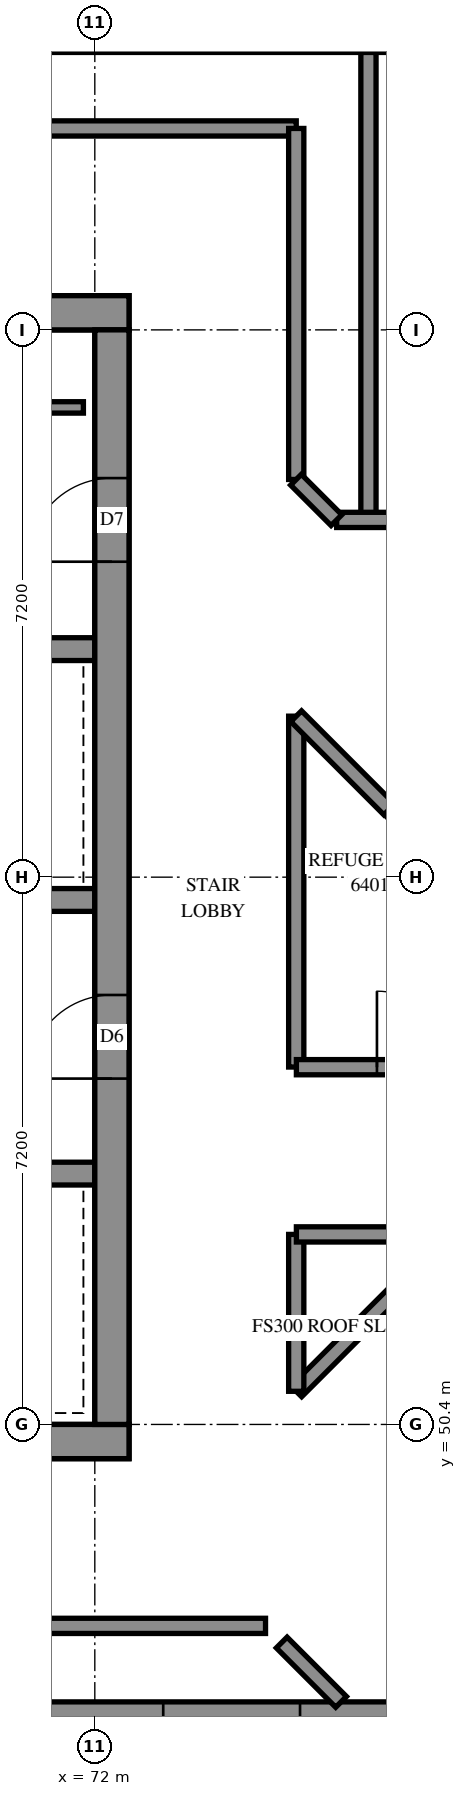
"""IFC4 building model, lengths in metres.
Left out: names, types, materials, properties, quantities, classifications, styles, units other than length and angle.
Written with IfcOpenShell. Run it as: python <this file> out.ifc"""

import sys

from ifc_helpers import new_model, si_unit, direction, frame, frame_2d, origin, place, context, subcontext, project, spatial, polyline, rectangle, outline, extrude, element, fill, save


model = new_model("IFC4")
c1 = context("Model", 3, precision=1e-05, world=origin(), true_north=direction((0.0, 1.0)))
c2 = subcontext(c1, "Body", "Model", "MODEL_VIEW")
j1 = project(units=[si_unit("LENGTHUNIT", "METRE"), si_unit("PLANEANGLEUNIT", "RADIAN")], contexts=[c1])
p1 = place(None, origin())
s1 = spatial("IfcSite", under=j1, at=p1, CompositionType="ELEMENT")
p2 = place(p1, origin())
s2 = spatial("IfcBuilding", under=s1, at=p2, CompositionType="ELEMENT")
p3 = place(p2, frame((0.0, 0.0, 234.6)))
s3 = spatial("IfcBuildingStorey", under=s2, at=p3, CompositionType="ELEMENT", Elevation=234.6)
p4 = place(p3, frame((57.15, 50.175, -0.3), z_axis=(0.0, 0.0, 1.0), x_axis=(1.0, 0.0, 0.0)))
e1 = element("IfcWall", 1, at=p4, inside=s3, PredefinedType="SHEAR", context=c2, shape_type="SweptSolid", body=[
    extrude(rectangle(XDim=15.3, YDim=0.45, at=frame_2d((7.65, 0.0))), origin(), (0.0, 0.0, 1.0), 4.3),
])
p5 = place(p3, frame((57.15, 65.025, -0.3), z_axis=(0.0, 0.0, 1.0), x_axis=(1.0, 0.0, 0.0)))
e2 = element("IfcWall", 2, at=p5, inside=s3, PredefinedType="SHEAR", context=c2, shape_type="SweptSolid", body=[
    extrude(rectangle(XDim=15.3, YDim=0.45, at=frame_2d((7.65, 0.0))), origin(), (0.0, 0.0, 1.0), 4.3),
])
p6 = place(p5, frame((10.45, 0.0, 0.3)))
e3 = element("IfcOpeningElement", 3, at=p6, cuts=e2, PredefinedType="OPENING", context=c2, shape_type="SweptSolid", body=[
    extrude(rectangle(XDim=0.8, YDim=2.1, at=frame_2d((0.4, 1.05))), frame((0.0, 0.235, 0.0), z_axis=(0.0, -1.0, 0.0), x_axis=(1.0, 0.0, 0.0)), (0.0, 0.0, 1.0), 0.47),
])
p7 = place(p3, frame((72.225, 50.4, -0.3), z_axis=(0.0, 0.0, 1.0), x_axis=(0.0, 1.0, 0.0)))
e4 = element("IfcWall", 4, at=p7, inside=s3, PredefinedType="SHEAR", context=c2, shape_type="SweptSolid", body=[
    extrude(rectangle(XDim=14.4, YDim=0.45, at=frame_2d((7.2, 0.0))), origin(), (0.0, 0.0, 1.0), 4.3),
])
p8 = place(p7, frame((4.55, 0.0, 0.3)))
e5 = element("IfcOpeningElement", 5, at=p8, cuts=e4, PredefinedType="OPENING", context=c2, shape_type="SweptSolid", body=[
    extrude(rectangle(XDim=1.1, YDim=2.1, at=frame_2d((0.55, 1.05))), frame((0.0, 0.235, 0.0), z_axis=(0.0, -1.0, 0.0), x_axis=(1.0, 0.0, 0.0)), (0.0, 0.0, 1.0), 0.47),
])
p9 = place(p7, frame((11.35, 0.0, 0.3)))
e6 = element("IfcOpeningElement", 6, at=p9, cuts=e4, PredefinedType="OPENING", context=c2, shape_type="SweptSolid", body=[
    extrude(rectangle(XDim=1.1, YDim=2.1, at=frame_2d((0.55, 1.05))), frame((0.0, 0.235, 0.0), z_axis=(0.0, -1.0, 0.0), x_axis=(1.0, 0.0, 0.0)), (0.0, 0.0, 1.0), 0.47),
])
p10 = place(p3, frame((57.6, 53.7, 0.0), z_axis=(0.0, 0.0, 1.0), x_axis=(1.0, 0.0, 0.0)))
e7 = element("IfcWall", 7, at=p10, inside=s3, PredefinedType="SOLIDWALL", context=c2, shape_type="SweptSolid", body=[
    extrude(rectangle(XDim=14.4, YDim=0.3, at=frame_2d((7.2, 0.0))), origin(), (0.0, 0.0, 1.0), 4.7),
])
p11 = place(p10, frame((1.35, 0.0, 0.0)))
e8 = element("IfcOpeningElement", 8, at=p11, cuts=e7, PredefinedType="OPENING", context=c2, shape_type="SweptSolid", body=[
    extrude(rectangle(XDim=0.9, YDim=2.1, at=frame_2d((0.45, 1.05))), frame((0.0, 0.16, 0.0), z_axis=(0.0, -1.0, 0.0), x_axis=(1.0, 0.0, 0.0)), (0.0, 0.0, 1.0), 0.32),
])
p12 = place(p10, frame((4.95, 0.0, 0.0)))
e9 = element("IfcOpeningElement", 9, at=p12, cuts=e7, PredefinedType="OPENING", context=c2, shape_type="SweptSolid", body=[
    extrude(rectangle(XDim=0.9, YDim=2.1, at=frame_2d((0.45, 1.05))), frame((0.0, 0.16, 0.0), z_axis=(0.0, -1.0, 0.0), x_axis=(1.0, 0.0, 0.0)), (0.0, 0.0, 1.0), 0.32),
])
p13 = place(p10, frame((8.55, 0.0, 0.0)))
e10 = element("IfcOpeningElement", 10, at=p13, cuts=e7, PredefinedType="OPENING", context=c2, shape_type="SweptSolid", body=[
    extrude(rectangle(XDim=0.9, YDim=2.1, at=frame_2d((0.45, 1.05))), frame((0.0, 0.16, 0.0), z_axis=(0.0, -1.0, 0.0), x_axis=(1.0, 0.0, 0.0)), (0.0, 0.0, 1.0), 0.32),
])
p14 = place(p10, frame((12.05, 0.0, 0.0)))
e11 = element("IfcOpeningElement", 11, at=p14, cuts=e7, PredefinedType="OPENING", context=c2, shape_type="SweptSolid", body=[
    extrude(rectangle(XDim=1.1, YDim=2.1, at=frame_2d((0.55, 1.05))), frame((0.0, 0.16, 0.0), z_axis=(0.0, -1.0, 0.0), x_axis=(1.0, 0.0, 0.0)), (0.0, 0.0, 1.0), 0.32),
])
p15 = place(p3, frame((57.6, 57.3, 0.0), z_axis=(0.0, 0.0, 1.0), x_axis=(1.0, 0.0, 0.0)))
e12 = element("IfcWall", 12, at=p15, inside=s3, PredefinedType="SOLIDWALL", context=c2, shape_type="SweptSolid", body=[
    extrude(rectangle(XDim=14.4, YDim=0.3, at=frame_2d((7.2, 0.0))), origin(), (0.0, 0.0, 1.0), 4.7),
])
p16 = place(p15, frame((1.25, 0.0, 0.0)))
e13 = element("IfcOpeningElement", 13, at=p16, cuts=e12, PredefinedType="OPENING", context=c2, shape_type="SweptSolid", body=[
    extrude(rectangle(XDim=1.1, YDim=2.1, at=frame_2d((0.55, 1.05))), frame((0.0, 0.16, 0.0), z_axis=(0.0, -1.0, 0.0), x_axis=(1.0, 0.0, 0.0)), (0.0, 0.0, 1.0), 0.32),
])
p17 = place(p15, frame((4.85, 0.0, 0.0)))
e14 = element("IfcOpeningElement", 14, at=p17, cuts=e12, PredefinedType="OPENING", context=c2, shape_type="SweptSolid", body=[
    extrude(rectangle(XDim=1.1, YDim=2.1, at=frame_2d((0.55, 1.05))), frame((0.0, 0.16, 0.0), z_axis=(0.0, -1.0, 0.0), x_axis=(1.0, 0.0, 0.0)), (0.0, 0.0, 1.0), 0.32),
])
p18 = place(p15, frame((8.45, 0.0, 0.0)))
e15 = element("IfcOpeningElement", 15, at=p18, cuts=e12, PredefinedType="OPENING", context=c2, shape_type="SweptSolid", body=[
    extrude(rectangle(XDim=1.1, YDim=2.1, at=frame_2d((0.55, 1.05))), frame((0.0, 0.16, 0.0), z_axis=(0.0, -1.0, 0.0), x_axis=(1.0, 0.0, 0.0)), (0.0, 0.0, 1.0), 0.32),
])
p19 = place(p15, frame((12.05, 0.0, 0.0)))
e16 = element("IfcOpeningElement", 16, at=p19, cuts=e12, PredefinedType="OPENING", context=c2, shape_type="SweptSolid", body=[
    extrude(rectangle(XDim=1.1, YDim=2.1, at=frame_2d((0.55, 1.05))), frame((0.0, 0.16, 0.0), z_axis=(0.0, -1.0, 0.0), x_axis=(1.0, 0.0, 0.0)), (0.0, 0.0, 1.0), 0.32),
])
p20 = place(p3, frame((64.8, 60.6, 0.0), z_axis=(0.0, 0.0, 1.0), x_axis=(1.0, 0.0, 0.0)))
e17 = element("IfcWall", 17, at=p20, inside=s3, PredefinedType="SOLIDWALL", context=c2, shape_type="SweptSolid", body=[
    extrude(rectangle(XDim=7.2, YDim=0.3, at=frame_2d((3.6, 0.0))), origin(), (0.0, 0.0, 1.0), 4.7),
])
p21 = place(p3, frame((77.844, 68.725, 0.0), z_axis=(0.0, 0.0, 1.0), x_axis=(-1.0, 0.0, 0.0)))
e18 = element("IfcWall", 18, at=p21, inside=s3, PredefinedType="SOLIDWALL", context=c2, shape_type="SweptSolid", body=[
    extrude(outline(polyline([(-0.114, -0.275), (46.044, -0.275), (45.493, 0.275), (0.114, 0.275), (-0.114, -0.275)])), origin(), (0.0, 0.0, 1.0), 4.7),
])
p22 = place(p21, frame((3.193, 0.0, 0.9)))
e19 = element("IfcOpeningElement", 19, at=p22, cuts=e18, PredefinedType="OPENING", context=c2, shape_type="SweptSolid", body=[
    extrude(rectangle(XDim=1.8, YDim=3.6, at=frame_2d((0.9, 1.8))), frame((0.0, 0.285, 0.0), z_axis=(0.0, -1.0, 0.0), x_axis=(1.0, 0.0, 0.0)), (0.0, 0.0, 1.0), 0.57),
])
p23 = place(p21, frame((6.744, 0.0, 0.9)))
e20 = element("IfcOpeningElement", 20, at=p23, cuts=e18, PredefinedType="OPENING", context=c2, shape_type="SweptSolid", body=[
    extrude(rectangle(XDim=1.8, YDim=3.6, at=frame_2d((0.9, 1.8))), frame((0.0, 0.285, 0.0), z_axis=(0.0, -1.0, 0.0), x_axis=(1.0, 0.0, 0.0)), (0.0, 0.0, 1.0), 0.57),
])
p24 = place(p21, frame((10.344, 0.0, 0.9)))
e21 = element("IfcOpeningElement", 21, at=p24, cuts=e18, PredefinedType="OPENING", context=c2, shape_type="SweptSolid", body=[
    extrude(rectangle(XDim=1.8, YDim=3.6, at=frame_2d((0.9, 1.8))), frame((0.0, 0.285, 0.0), z_axis=(0.0, -1.0, 0.0), x_axis=(1.0, 0.0, 0.0)), (0.0, 0.0, 1.0), 0.57),
])
p25 = place(p21, frame((13.944, 0.0, 0.9)))
e22 = element("IfcOpeningElement", 22, at=p25, cuts=e18, PredefinedType="OPENING", context=c2, shape_type="SweptSolid", body=[
    extrude(rectangle(XDim=1.8, YDim=3.6, at=frame_2d((0.9, 1.8))), frame((0.0, 0.285, 0.0), z_axis=(0.0, -1.0, 0.0), x_axis=(1.0, 0.0, 0.0)), (0.0, 0.0, 1.0), 0.57),
])
p26 = place(p21, frame((17.544, 0.0, 0.9)))
e23 = element("IfcOpeningElement", 23, at=p26, cuts=e18, PredefinedType="OPENING", context=c2, shape_type="SweptSolid", body=[
    extrude(rectangle(XDim=1.8, YDim=3.6, at=frame_2d((0.9, 1.8))), frame((0.0, 0.285, 0.0), z_axis=(0.0, -1.0, 0.0), x_axis=(1.0, 0.0, 0.0)), (0.0, 0.0, 1.0), 0.57),
])
p27 = place(p21, frame((21.143, 0.0, 0.9)))
e24 = element("IfcOpeningElement", 24, at=p27, cuts=e18, PredefinedType="OPENING", context=c2, shape_type="SweptSolid", body=[
    extrude(rectangle(XDim=1.8, YDim=3.6, at=frame_2d((0.9, 1.8))), frame((0.0, 0.285, 0.0), z_axis=(0.0, -1.0, 0.0), x_axis=(1.0, 0.0, 0.0)), (0.0, 0.0, 1.0), 0.57),
])
p28 = place(p21, frame((24.744, 0.0, 0.9)))
e25 = element("IfcOpeningElement", 25, at=p28, cuts=e18, PredefinedType="OPENING", context=c2, shape_type="SweptSolid", body=[
    extrude(rectangle(XDim=1.8, YDim=3.6, at=frame_2d((0.9, 1.8))), frame((0.0, 0.285, 0.0), z_axis=(0.0, -1.0, 0.0), x_axis=(1.0, 0.0, 0.0)), (0.0, 0.0, 1.0), 0.57),
])
p29 = place(p21, frame((28.343, 0.0, 0.9)))
e26 = element("IfcOpeningElement", 26, at=p29, cuts=e18, PredefinedType="OPENING", context=c2, shape_type="SweptSolid", body=[
    extrude(rectangle(XDim=1.8, YDim=3.6, at=frame_2d((0.9, 1.8))), frame((0.0, 0.285, 0.0), z_axis=(0.0, -1.0, 0.0), x_axis=(1.0, 0.0, 0.0)), (0.0, 0.0, 1.0), 0.57),
])
p30 = place(p21, frame((31.944, 0.0, 0.9)))
e27 = element("IfcOpeningElement", 27, at=p30, cuts=e18, PredefinedType="OPENING", context=c2, shape_type="SweptSolid", body=[
    extrude(rectangle(XDim=1.8, YDim=3.6, at=frame_2d((0.9, 1.8))), frame((0.0, 0.285, 0.0), z_axis=(0.0, -1.0, 0.0), x_axis=(1.0, 0.0, 0.0)), (0.0, 0.0, 1.0), 0.57),
])
p31 = place(p21, frame((35.544, 0.0, 0.9)))
e28 = element("IfcOpeningElement", 28, at=p31, cuts=e18, PredefinedType="OPENING", context=c2, shape_type="SweptSolid", body=[
    extrude(rectangle(XDim=1.8, YDim=3.6, at=frame_2d((0.9, 1.8))), frame((0.0, 0.285, 0.0), z_axis=(0.0, -1.0, 0.0), x_axis=(1.0, 0.0, 0.0)), (0.0, 0.0, 1.0), 0.57),
])
p32 = place(p3, frame((53.675, 46.475, 0.0), z_axis=(0.0, 0.0, 1.0), x_axis=(1.0, 0.0, 0.0)))
e29 = element("IfcWall", 29, at=p32, inside=s3, PredefinedType="SOLIDWALL", context=c2, shape_type="SweptSolid", body=[
    extrude(outline(polyline([(-0.275, -0.275), (24.958, -0.275), (24.958, 0.275), (0.275, 0.275), (-0.275, -0.275)])), origin(), (0.0, 0.0, 1.0), 4.7),
])
p33 = place(p32, frame((1.3, 0.0, 0.9)))
e30 = element("IfcOpeningElement", 30, at=p33, cuts=e29, PredefinedType="OPENING", context=c2, shape_type="SweptSolid", body=[
    extrude(rectangle(XDim=1.8, YDim=3.6, at=frame_2d((0.9, 1.8))), frame((0.0, 0.285, 0.0), z_axis=(0.0, -1.0, 0.0), x_axis=(1.0, 0.0, 0.0)), (0.0, 0.0, 1.0), 0.57),
])
p34 = place(p32, frame((4.825, 0.0, 0.9)))
e31 = element("IfcOpeningElement", 31, at=p34, cuts=e29, PredefinedType="OPENING", context=c2, shape_type="SweptSolid", body=[
    extrude(rectangle(XDim=1.8, YDim=3.6, at=frame_2d((0.9, 1.8))), frame((0.0, 0.285, 0.0), z_axis=(0.0, -1.0, 0.0), x_axis=(1.0, 0.0, 0.0)), (0.0, 0.0, 1.0), 0.57),
])
p35 = place(p32, frame((8.425, 0.0, 0.9)))
e32 = element("IfcOpeningElement", 32, at=p35, cuts=e29, PredefinedType="OPENING", context=c2, shape_type="SweptSolid", body=[
    extrude(rectangle(XDim=1.8, YDim=3.6, at=frame_2d((0.9, 1.8))), frame((0.0, 0.285, 0.0), z_axis=(0.0, -1.0, 0.0), x_axis=(1.0, 0.0, 0.0)), (0.0, 0.0, 1.0), 0.57),
])
p36 = place(p32, frame((12.025, 0.0, 0.9)))
e33 = element("IfcOpeningElement", 33, at=p36, cuts=e29, PredefinedType="OPENING", context=c2, shape_type="SweptSolid", body=[
    extrude(rectangle(XDim=1.8, YDim=3.6, at=frame_2d((0.9, 1.8))), frame((0.0, 0.285, 0.0), z_axis=(0.0, -1.0, 0.0), x_axis=(1.0, 0.0, 0.0)), (0.0, 0.0, 1.0), 0.57),
])
p37 = place(p32, frame((15.625, 0.0, 0.9)))
e34 = element("IfcOpeningElement", 34, at=p37, cuts=e29, PredefinedType="OPENING", context=c2, shape_type="SweptSolid", body=[
    extrude(rectangle(XDim=1.8, YDim=3.6, at=frame_2d((0.9, 1.8))), frame((0.0, 0.285, 0.0), z_axis=(0.0, -1.0, 0.0), x_axis=(1.0, 0.0, 0.0)), (0.0, 0.0, 1.0), 0.57),
])
p38 = place(p32, frame((19.225, 0.0, 0.9)))
e35 = element("IfcOpeningElement", 35, at=p38, cuts=e29, PredefinedType="OPENING", context=c2, shape_type="SweptSolid", body=[
    extrude(rectangle(XDim=1.8, YDim=3.6, at=frame_2d((0.9, 1.8))), frame((0.0, 0.285, 0.0), z_axis=(0.0, -1.0, 0.0), x_axis=(1.0, 0.0, 0.0)), (0.0, 0.0, 1.0), 0.57),
])
p39 = place(p32, frame((22.3, 0.0, 0.9)))
e36 = element("IfcOpeningElement", 36, at=p39, cuts=e29, PredefinedType="OPENING", context=c2, shape_type="SweptSolid", body=[
    extrude(rectangle(XDim=1.8, YDim=3.6, at=frame_2d((0.9, 1.8))), frame((0.0, 0.285, 0.0), z_axis=(0.0, -1.0, 0.0), x_axis=(1.0, 0.0, 0.0)), (0.0, 0.0, 1.0), 0.57),
])
p40 = place(p3, frame((64.95, 63.78, 0.0), z_axis=(0.0, 0.0, 1.0), x_axis=(1.0, 0.0, 0.0)))
e37 = element("IfcWall", 37, at=p40, inside=s3, PredefinedType="PARTITIONING", context=c2, shape_type="SweptSolid", body=[
    extrude(rectangle(XDim=6.9, YDim=0.15, at=frame_2d((3.45, 0.0))), origin(), (0.0, 0.0, 1.0), 4.7),
])
p41 = place(p3, frame((54.95, 67.45, 0.0), z_axis=(0.0, 0.0, 1.0), x_axis=(1.0, 0.0, 0.0)))
e38 = element("IfcWall", 38, at=p41, inside=s3, PredefinedType="PARTITIONING", context=c2, shape_type="SweptSolid", body=[
    extrude(rectangle(XDim=19.7, YDim=0.2, at=frame_2d((9.85, 0.0))), origin(), (0.0, 0.0, 1.0), 4.7),
])
p42 = place(p3, frame((54.95, 47.75, 0.0), z_axis=(0.0, 0.0, 1.0), x_axis=(1.0, 0.0, 0.0)))
e39 = element("IfcWall", 39, at=p42, inside=s3, PredefinedType="PARTITIONING", context=c2, shape_type="SweptSolid", body=[
    extrude(rectangle(XDim=19.296, YDim=0.2, at=frame_2d((9.648, 0.0))), origin(), (0.0, 0.0, 1.0), 4.7),
])
p43 = place(p3, frame((75.6, 62.3, 0.0), z_axis=(0.0, 0.0, 1.0), x_axis=(0.0, 1.0, 0.0)))
e40 = element("IfcWall", 40, at=p43, inside=s3, PredefinedType="PARTITIONING", context=c2, shape_type="SweptSolid", body=[
    extrude(rectangle(XDim=6.15, YDim=0.2, at=frame_2d((3.075, 0.0))), origin(), (0.0, 0.0, 1.0), 4.7),
])
p44 = place(p3, frame((74.65, 62.832, 0.0), z_axis=(0.0, 0.0, 1.0), x_axis=(0.0, 1.0, 0.0)))
e41 = element("IfcWall", 41, at=p44, inside=s3, PredefinedType="PARTITIONING", context=c2, shape_type="SweptSolid", body=[
    extrude(rectangle(XDim=4.618, YDim=0.2, at=frame_2d((2.309, 0.0))), origin(), (0.0, 0.0, 1.0), 4.7),
])
p45 = place(p3, frame((74.65, 55.102, 0.0), z_axis=(0.0, 0.0, 1.0), x_axis=(0.0, 1.0, 0.0)))
e42 = element("IfcWall", 42, at=p45, inside=s3, PredefinedType="PARTITIONING", context=c2, shape_type="SweptSolid", body=[
    extrude(rectangle(XDim=4.616, YDim=0.2, at=frame_2d((2.308, 0.0))), origin(), (0.0, 0.0, 1.0), 4.7),
])
p46 = place(p3, frame((74.652, 55.1, 0.0), z_axis=(0.0, 0.0, 1.0), x_axis=(1.0, 0.0, 0.0)))
e43 = element("IfcWall", 43, at=p46, inside=s3, PredefinedType="PARTITIONING", context=c2, shape_type="SweptSolid", body=[
    extrude(rectangle(XDim=4.616, YDim=0.2, at=frame_2d((2.308, 0.0))), origin(), (0.0, 0.0, 1.0), 4.7),
])
p47 = place(p46, frame((1.06, 0.0, 0.0)))
e44 = element("IfcOpeningElement", 44, at=p47, cuts=e43, PredefinedType="OPENING", context=c2, shape_type="SweptSolid", body=[
    extrude(rectangle(XDim=1.0, YDim=2.1, at=frame_2d((0.5, 1.05))), frame((0.0, 0.11, 0.0), z_axis=(0.0, -1.0, 0.0), x_axis=(1.0, 0.0, 0.0)), (0.0, 0.0, 1.0), 0.22),
])
p48 = place(p3, frame((75.182, 62.3, 0.0), z_axis=(0.0, 0.0, 1.0), x_axis=(1.0, 0.0, 0.0)))
e45 = element("IfcWall", 45, at=p48, inside=s3, PredefinedType="PARTITIONING", context=c2, shape_type="SweptSolid", body=[
    extrude(rectangle(XDim=4.018, YDim=0.2, at=frame_2d((2.009, 0.0))), origin(), (0.0, 0.0, 1.0), 4.7),
])
p49 = place(p3, frame((74.651, 50.835, 0.0), z_axis=(0.0, 0.0, 1.0), x_axis=(0.7071067812, 0.7071067812, 0.0)))
e46 = element("IfcWall", 46, at=p49, inside=s3, PredefinedType="PARTITIONING", context=c2, shape_type="SweptSolid", body=[
    extrude(rectangle(XDim=2.919, YDim=0.2, at=frame_2d((1.459, 0.0))), origin(), (0.0, 0.0, 1.0), 4.7),
])
p50 = place(p3, frame((75.878, 58.496, 0.0), z_axis=(0.0, 0.0, 1.0), x_axis=(0.7075293128, -0.706683997, 0.0)))
e47 = element("IfcWall", 47, at=p50, inside=s3, PredefinedType="PARTITIONING", context=c2, shape_type="SweptSolid", body=[
    extrude(rectangle(XDim=2.366, YDim=0.2, at=frame_2d((1.183, 0.0))), origin(), (0.0, 0.0, 1.0), 4.7),
])
p51 = place(p3, frame((74.65, 50.836, 0.0), z_axis=(0.0, 0.0, 1.0), x_axis=(0.0, 1.0, 0.0)))
e48 = element("IfcWall", 48, at=p51, inside=s3, PredefinedType="PARTITIONING", context=c2, shape_type="SweptSolid", body=[
    extrude(rectangle(XDim=2.064, YDim=0.2, at=frame_2d((1.032, 0.0))), origin(), (0.0, 0.0, 1.0), 4.7),
])
p52 = place(p3, frame((74.652, 52.9, 0.0), z_axis=(0.0, 0.0, 1.0), x_axis=(1.0, 0.0, 0.0)))
e49 = element("IfcWall", 49, at=p52, inside=s3, PredefinedType="PARTITIONING", context=c2, shape_type="SweptSolid", body=[
    extrude(rectangle(XDim=2.062, YDim=0.2, at=frame_2d((1.031, 0.0))), origin(), (0.0, 0.0, 1.0), 4.7),
])
p53 = place(p3, frame((74.649, 59.717, 0.0), z_axis=(0.0, 0.0, 1.0), x_axis=(0.7065293157, -0.7076837754, 0.0)))
e50 = element("IfcWall", 50, at=p53, inside=s3, PredefinedType="PARTITIONING", context=c2, shape_type="SweptSolid", body=[
    extrude(rectangle(XDim=1.732, YDim=0.2, at=frame_2d((0.866, 0.0))), origin(), (0.0, 0.0, 1.0), 4.7),
])
p54 = place(p3, frame((74.459, 47.531, 0.0), z_axis=(0.0, 0.0, 1.0), x_axis=(0.7071520462, -0.7070615133, 0.0)))
e51 = element("IfcWall", 51, at=p54, inside=s3, PredefinedType="PARTITIONING", context=c2, shape_type="SweptSolid", body=[
    extrude(rectangle(XDim=1.105, YDim=0.2, at=frame_2d((0.552, 0.0))), origin(), (0.0, 0.0, 1.0), 4.7),
])
p55 = place(p3, frame((74.647, 62.829, 0.0), z_axis=(0.0, 0.0, 1.0), x_axis=(0.7071067812, -0.7071067812, 0.0)))
e52 = element("IfcWall", 52, at=p55, inside=s3, PredefinedType="PARTITIONING", context=c2, shape_type="SweptSolid", body=[
    extrude(rectangle(XDim=0.752, YDim=0.2, at=frame_2d((0.376, 0.0))), origin(), (0.0, 0.0, 1.0), 4.7),
])
p56 = place(p38, origin())
e53 = element("IfcWindow", 53, at=p56, inside=s3, PartitioningType="SINGLE_PANEL", PredefinedType="WINDOW", context=c2, shape_type="SweptSolid", body=[
    extrude(rectangle(XDim=1.8, YDim=3.6, at=frame_2d((0.9, 1.8))), frame((0.0, 0.155, 0.0), z_axis=(0.0, -1.0, 0.0), x_axis=(1.0, 0.0, 0.0)), (0.0, 0.0, 1.0), 0.06),
])
fill(e35, e53)
p57 = place(p8, origin())
e54 = element("IfcDoor", 54, at=p57, inside=s3, OperationType="DOUBLE_DOOR_SINGLE_SWING", PredefinedType="DOOR", context=c2, shape_type="SweptSolid", body=[
    extrude(rectangle(XDim=1.1, YDim=2.1, at=frame_2d((0.55, 1.05))), frame((0.0, 0.025, 0.0), z_axis=(0.0, -1.0, 0.0), x_axis=(1.0, 0.0, 0.0)), (0.0, 0.0, 1.0), 0.05),
])
fill(e5, e54)
p58 = place(p9, origin())
e55 = element("IfcDoor", 55, at=p58, inside=s3, OperationType="SINGLE_SWING_RIGHT", PredefinedType="DOOR", context=c2, shape_type="SweptSolid", body=[
    extrude(rectangle(XDim=1.1, YDim=2.1, at=frame_2d((0.55, 1.05))), frame((0.0, 0.025, 0.0), z_axis=(0.0, -1.0, 0.0), x_axis=(1.0, 0.0, 0.0)), (0.0, 0.0, 1.0), 0.05),
])
fill(e6, e55)
p59 = place(p47, origin())
e56 = element("IfcDoor", 56, at=p59, inside=s3, OperationType="SINGLE_SWING_LEFT", PredefinedType="DOOR", context=c2, shape_type="SweptSolid", body=[
    extrude(rectangle(XDim=1.0, YDim=2.1, at=frame_2d((0.5, 1.05))), frame((0.0, 0.025, 0.0), z_axis=(0.0, -1.0, 0.0), x_axis=(1.0, 0.0, 0.0)), (0.0, 0.0, 1.0), 0.05),
])
fill(e44, e56)
save(model, sys.argv[1])
